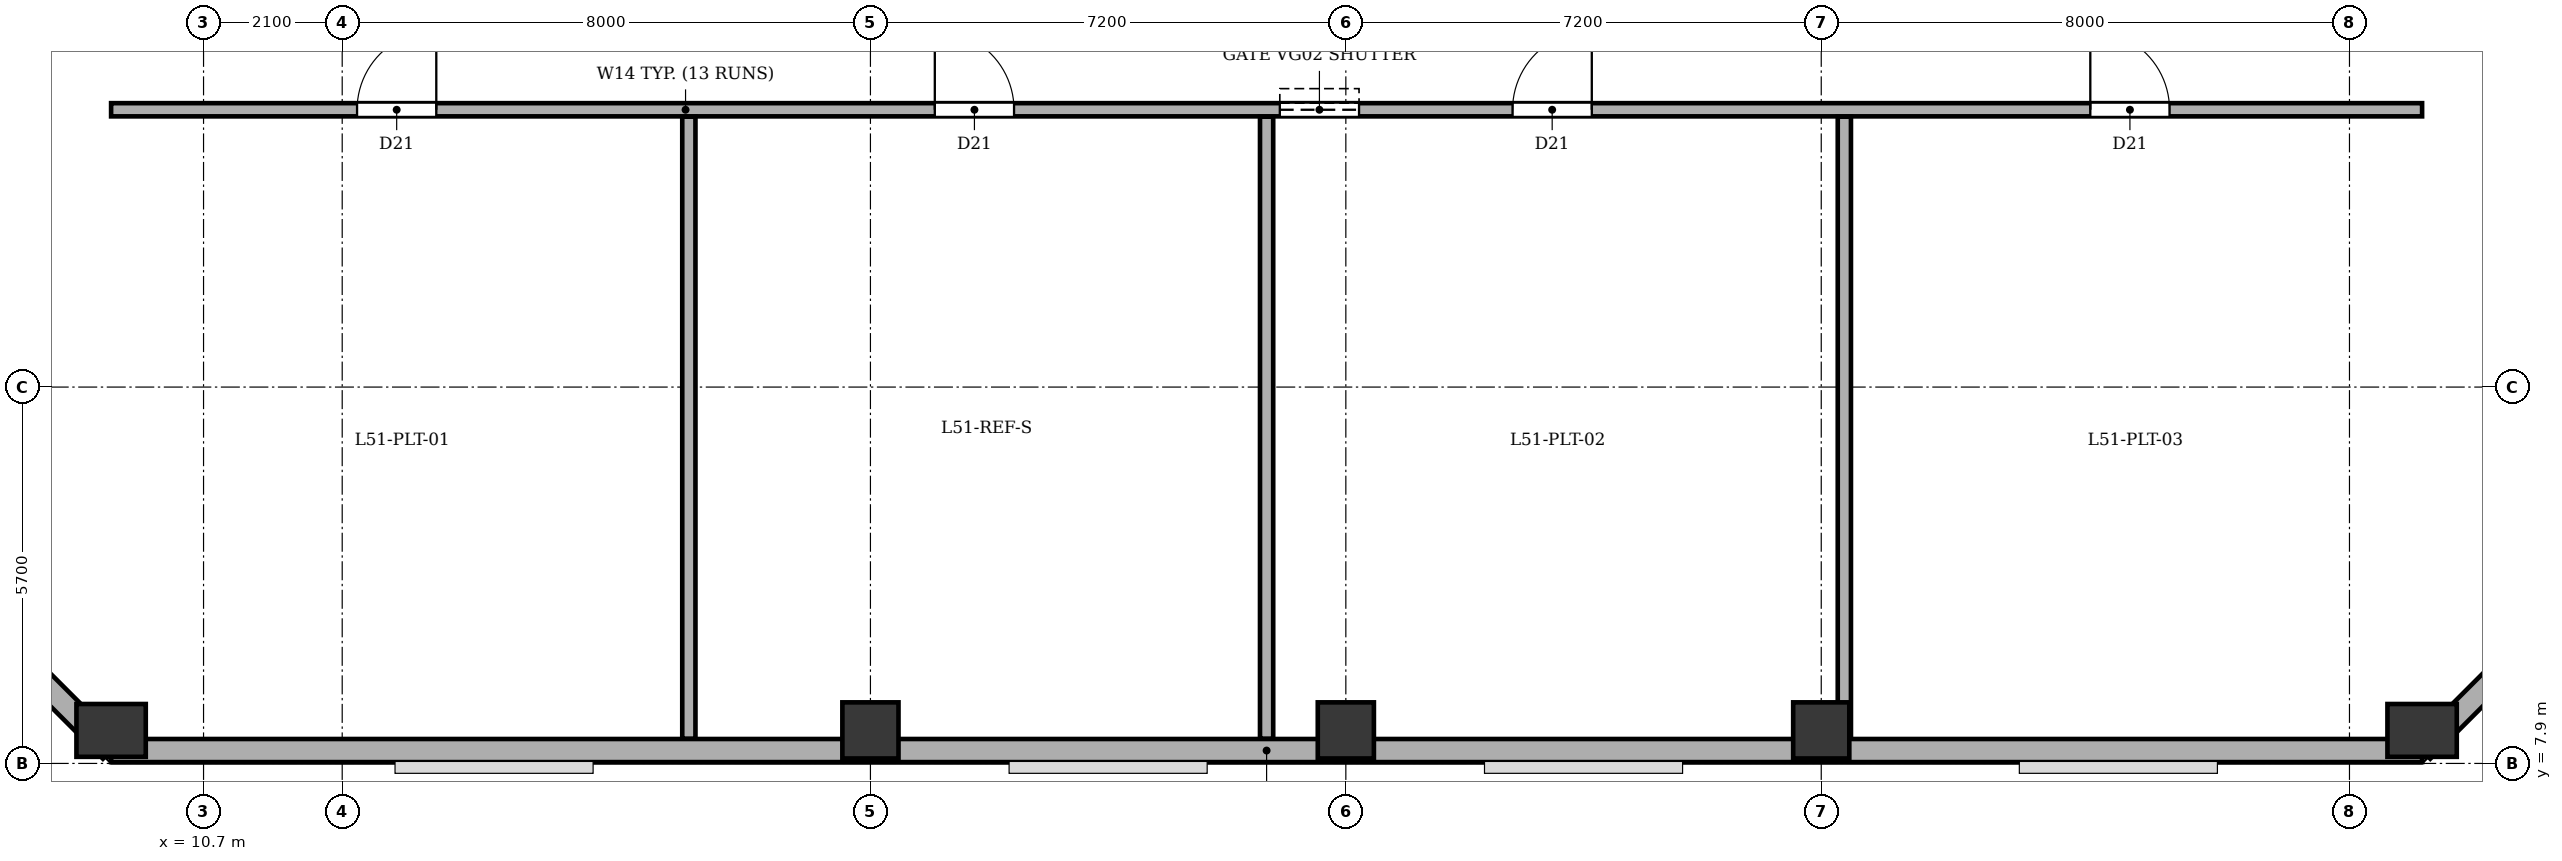
"""IFC4 building model, lengths in metres.
Left out: names, types, materials, properties, quantities, classifications, styles, units other than length and angle.
Written with IfcOpenShell. Run it as: python <this file> out.ifc"""

import sys

from ifc_helpers import new_model, si_unit, direction, frame, frame_2d, origin, origin_2d, place, context, subcontext, project, spatial, rectangle, extrude, element, fill, save


model = new_model("IFC4")
c1 = context("Model", 3, precision=1e-05, world=origin(), true_north=direction((0.0, 1.0)))
c2 = subcontext(c1, "Body", "Model", "MODEL_VIEW")
j1 = project(units=[si_unit("LENGTHUNIT", "METRE"), si_unit("PLANEANGLEUNIT", "RADIAN")], contexts=[c1])
p1 = place(None, origin())
s1 = spatial("IfcSite", under=j1, at=p1, CompositionType="ELEMENT")
p2 = place(p1, origin())
s2 = spatial("IfcBuilding", under=s1, at=p2, CompositionType="ELEMENT")
p3 = place(p2, frame((0.0, 0.0, 197.3)))
s3 = spatial("IfcBuildingStorey", under=s2, at=p3, CompositionType="ELEMENT", Elevation=197.3)
p4 = place(p3, frame((9.3, 8.4, 0.0), z_axis=(0.0, 0.0, 1.0), x_axis=(1.0, 0.0, 0.0)))
e1 = element("IfcColumn", 1, at=p4, inside=s3, PredefinedType="COLUMN", context=c2, shape_type="SweptSolid", body=[
    extrude(rectangle(XDim=0.8, YDim=1.05, at=origin_2d()), origin(), (0.0, 0.0, 1.0), 5.4),
])
for number, where, z_axis, x_axis in (
    (2, (20.8, 8.4, 0.0), (0.0, 0.0, 1.0), (1.0, 0.0, 0.0)),
    (3, (28.0, 8.4, 0.0), (0.0, 0.0, 1.0), (1.0, 0.0, 0.0)),
    (4, (35.2, 8.4, 0.0), (0.0, 0.0, 1.0), (1.0, 0.0, 0.0)),
):
    element("IfcColumn", number, at=place(p3, frame(where, z_axis=z_axis, x_axis=x_axis)), inside=s3, PredefinedType="COLUMN", context=c2, shape_type="SweptSolid", body=[
        extrude(rectangle(XDim=0.85, YDim=0.85, at=origin_2d()), origin(), (0.0, 0.0, 1.0), 5.4),
    ])
p5 = place(p3, frame((44.3, 8.4, 0.0), z_axis=(0.0, 0.0, 1.0), x_axis=(1.0, 0.0, 0.0)))
e5 = element("IfcColumn", 5, at=p5, inside=s3, PredefinedType="COLUMN", context=c2, shape_type="SweptSolid", body=[
    extrude(rectangle(XDim=0.8, YDim=1.05, at=origin_2d()), origin(), (0.0, 0.0, 1.0), 5.4),
])
p6 = place(p3, frame((44.3, 8.095, 0.0), z_axis=(0.0, 0.0, 1.0), x_axis=(-1.0, 0.0, 0.0)))
e6 = element("IfcWall", 6, at=p6, inside=s3, PredefinedType="STANDARD", context=c2, shape_type="SweptSolid", body=[
    extrude(rectangle(XDim=35.0, YDim=0.35, at=frame_2d((17.5, 0.0))), origin(), (0.0, 0.0, 1.0), 4.625),
])
for number, where, z_axis, x_axis in (
    (7, (9.3, 8.095, 0.0), (0.0, 0.0, 1.0), (-0.707, 0.707, 0.0)),
    (8, (49.105, 12.9, 0.0), (0.0, 0.0, 1.0), (-0.707, -0.707, 0.0)),
):
    element("IfcWall", number, at=place(p3, frame(where, z_axis=z_axis, x_axis=x_axis)), inside=s3, PredefinedType="STANDARD", context=c2, shape_type="SweptSolid", body=[
        extrude(rectangle(XDim=6.795, YDim=0.35, at=frame_2d((3.397, 0.0))), origin(), (0.0, 0.0, 1.0), 4.625),
    ])
p7 = place(p3, frame((9.3, 17.8, 0.0), z_axis=(0.0, 0.0, 1.0), x_axis=(1.0, 0.0, 0.0)))
e9 = element("IfcWall", 9, at=p7, inside=s3, PredefinedType="SOLIDWALL", context=c2, shape_type="SweptSolid", body=[
    extrude(rectangle(XDim=35.0, YDim=0.2, at=frame_2d((17.5, 0.0))), origin(), (0.0, 0.0, 1.0), 5.04),
])
p8 = place(p7, frame((3.725, 0.0, 0.0)))
e10 = element("IfcOpeningElement", 10, at=p8, cuts=e9, PredefinedType="OPENING", context=c2, shape_type="SweptSolid", body=[
    extrude(rectangle(XDim=1.2, YDim=2.15, at=frame_2d((0.6, 1.075))), frame((0.0, 0.11, 0.0), z_axis=(0.0, -1.0, 0.0), x_axis=(1.0, 0.0, 0.0)), (0.0, 0.0, 1.0), 0.22),
])
p9 = place(p7, frame((12.475, 0.0, 0.0)))
e11 = element("IfcOpeningElement", 11, at=p9, cuts=e9, PredefinedType="OPENING", context=c2, shape_type="SweptSolid", body=[
    extrude(rectangle(XDim=1.2, YDim=2.15, at=frame_2d((0.6, 1.075))), frame((0.0, 0.11, 0.0), z_axis=(0.0, -1.0, 0.0), x_axis=(1.0, 0.0, 0.0)), (0.0, 0.0, 1.0), 0.22),
])
p10 = place(p7, frame((21.225, 0.0, 0.0)))
e12 = element("IfcOpeningElement", 12, at=p10, cuts=e9, PredefinedType="OPENING", context=c2, shape_type="SweptSolid", body=[
    extrude(rectangle(XDim=1.2, YDim=2.15, at=frame_2d((0.6, 1.075))), frame((0.0, 0.11, 0.0), z_axis=(0.0, -1.0, 0.0), x_axis=(1.0, 0.0, 0.0)), (0.0, 0.0, 1.0), 0.22),
])
p11 = place(p7, frame((29.975, 0.0, 0.0)))
e13 = element("IfcOpeningElement", 13, at=p11, cuts=e9, PredefinedType="OPENING", context=c2, shape_type="SweptSolid", body=[
    extrude(rectangle(XDim=1.2, YDim=2.15, at=frame_2d((0.6, 1.075))), frame((0.0, 0.11, 0.0), z_axis=(0.0, -1.0, 0.0), x_axis=(1.0, 0.0, 0.0)), (0.0, 0.0, 1.0), 0.22),
])
p12 = place(p7, frame((17.7, 0.0, 0.0)))
e14 = element("IfcOpeningElement", 14, at=p12, cuts=e9, PredefinedType="OPENING", context=c2, shape_type="SweptSolid", body=[
    extrude(rectangle(XDim=1.2, YDim=2.15, at=frame_2d((0.6, 1.075))), frame((0.0, 0.11, 0.0), z_axis=(0.0, -1.0, 0.0), x_axis=(1.0, 0.0, 0.0)), (0.0, 0.0, 1.0), 0.22),
])
for number, where, z_axis, x_axis in (
    (15, (18.05, 8.275, 0.0), (0.0, 0.0, 1.0), (0.0, 1.0, 0.0)),
    (16, (26.8, 8.275, 0.0), (0.0, 0.0, 1.0), (0.0, 1.0, 0.0)),
):
    element("IfcWall", number, at=place(p3, frame(where, z_axis=z_axis, x_axis=x_axis)), inside=s3, PredefinedType="SOLIDWALL", context=c2, shape_type="SweptSolid", body=[
        extrude(rectangle(XDim=9.42, YDim=0.2, at=frame_2d((4.71, 0.0))), origin(), (0.0, 0.0, 1.0), 5.04),
    ])
p13 = place(p3, frame((35.55, 8.275, 0.0), z_axis=(0.0, 0.0, 1.0), x_axis=(0.0, 1.0, 0.0)))
e17 = element("IfcWall", 17, at=p13, inside=s3, PredefinedType="SOLIDWALL", context=c2, shape_type="SweptSolid", body=[
    extrude(rectangle(XDim=9.42, YDim=0.2, at=frame_2d((4.71, 0.0))), origin(), (0.0, 0.0, 1.0), 4.375),
])
p14 = place(p8, origin())
e18 = element("IfcDoor", 18, at=p14, inside=s3, OperationType="SINGLE_SWING_RIGHT", PredefinedType="DOOR", context=c2, shape_type="SweptSolid", body=[
    extrude(rectangle(XDim=1.2, YDim=2.15, at=frame_2d((0.6, 1.075))), frame((0.0, 0.025, 0.0), z_axis=(0.0, -1.0, 0.0), x_axis=(1.0, 0.0, 0.0)), (0.0, 0.0, 1.0), 0.05),
])
fill(e10, e18)
p15 = place(p9, origin())
e19 = element("IfcDoor", 19, at=p15, inside=s3, OperationType="SINGLE_SWING_LEFT", PredefinedType="DOOR", context=c2, shape_type="SweptSolid", body=[
    extrude(rectangle(XDim=1.2, YDim=2.15, at=frame_2d((0.6, 1.075))), frame((0.0, 0.025, 0.0), z_axis=(0.0, -1.0, 0.0), x_axis=(1.0, 0.0, 0.0)), (0.0, 0.0, 1.0), 0.05),
])
fill(e11, e19)
p16 = place(p10, origin())
e20 = element("IfcDoor", 20, at=p16, inside=s3, OperationType="SINGLE_SWING_RIGHT", PredefinedType="DOOR", context=c2, shape_type="SweptSolid", body=[
    extrude(rectangle(XDim=1.2, YDim=2.15, at=frame_2d((0.6, 1.075))), frame((0.0, 0.025, 0.0), z_axis=(0.0, -1.0, 0.0), x_axis=(1.0, 0.0, 0.0)), (0.0, 0.0, 1.0), 0.05),
])
fill(e12, e20)
p17 = place(p11, origin())
e21 = element("IfcDoor", 21, at=p17, inside=s3, OperationType="SINGLE_SWING_LEFT", PredefinedType="DOOR", context=c2, shape_type="SweptSolid", body=[
    extrude(rectangle(XDim=1.2, YDim=2.15, at=frame_2d((0.6, 1.075))), frame((0.0, 0.025, 0.0), z_axis=(0.0, -1.0, 0.0), x_axis=(1.0, 0.0, 0.0)), (0.0, 0.0, 1.0), 0.05),
])
fill(e13, e21)
p18 = place(p12, origin())
e22 = element("IfcDoor", 22, at=p18, inside=s3, OperationType="SINGLE_SWING_LEFT", PredefinedType="GATE", context=c2, shape_type="SweptSolid", body=[
    extrude(rectangle(XDim=1.2, YDim=2.15, at=frame_2d((0.6, 1.075))), frame((0.0, 0.025, 0.0), z_axis=(0.0, -1.0, 0.0), x_axis=(1.0, 0.0, 0.0)), (0.0, 0.0, 1.0), 0.05),
])
fill(e14, e22)
save(model, sys.argv[1])
